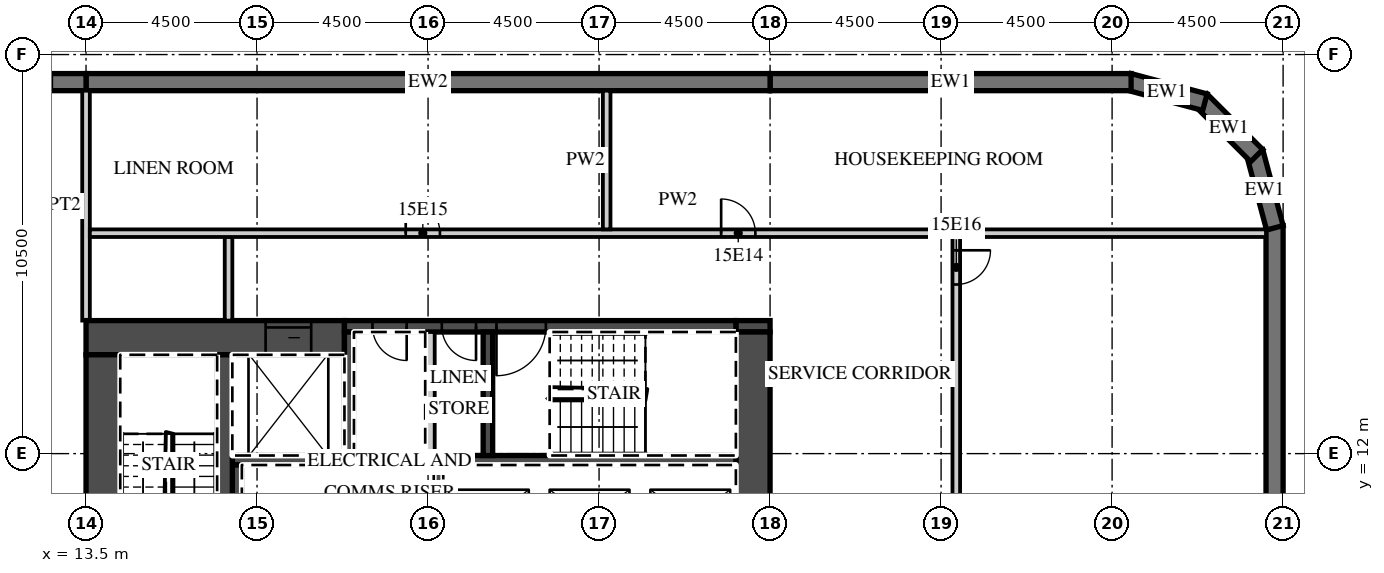
"""IFC4 building model, lengths in metres.
Left out: names, types, materials, properties, quantities, classifications, styles, units other than length and angle.
Written with IfcOpenShell. Run it as: python <this file> out.ifc"""

import sys

from ifc_helpers import new_model, si_unit, direction, frame, frame_2d, origin, place, context, subcontext, project, spatial, polyline, rectangle, outline, extrude, element, fill, save


model = new_model("IFC4")
c1 = context("Model", 3, precision=1e-05, world=origin(), true_north=direction((0.0, 1.0)))
c2 = subcontext(c1, "Body", "Model", "MODEL_VIEW")
j1 = project(units=[si_unit("LENGTHUNIT", "METRE"), si_unit("PLANEANGLEUNIT", "RADIAN")], contexts=[c1])
p1 = place(None, origin())
s1 = spatial("IfcSite", under=j1, at=p1, CompositionType="ELEMENT")
p2 = place(p1, origin())
s2 = spatial("IfcBuilding", under=s1, at=p2, CompositionType="ELEMENT")
p3 = place(p2, frame((0.0, 0.0, 79.8)))
s3 = spatial("IfcBuildingStorey", under=s2, at=p3, CompositionType="ELEMENT", Elevation=79.8)
p4 = place(p3, frame((44.775, -18.0, 0.0), z_axis=(0.0, 0.0, 1.0), x_axis=(0.0, 1.0, 0.0)))
e1 = element("IfcWall", 1, at=p4, inside=s3, PredefinedType="SOLIDWALL", context=c2, shape_type="SweptSolid", body=[
    extrude(rectangle(XDim=36.0, YDim=0.45, at=frame_2d((18.0, 0.0))), origin(), (0.0, 0.0, 1.0), 3.02),
])
p5 = place(p4, frame((3.9, 0.0, 0.45)))
e2 = element("IfcOpeningElement", 2, at=p5, cuts=e1, PredefinedType="OPENING", context=c2, shape_type="SweptSolid", body=[
    extrude(rectangle(XDim=3.3, YDim=2.25, at=frame_2d((1.65, 1.125))), frame((0.0, 0.235, 0.0), z_axis=(0.0, -1.0, 0.0), x_axis=(1.0, 0.0, 0.0)), (0.0, 0.0, 1.0), 0.47),
])
p6 = place(p4, frame((8.4, 0.0, 0.45)))
e3 = element("IfcOpeningElement", 3, at=p6, cuts=e1, PredefinedType="OPENING", context=c2, shape_type="SweptSolid", body=[
    extrude(rectangle(XDim=3.3, YDim=2.25, at=frame_2d((1.65, 1.125))), frame((0.0, 0.235, 0.0), z_axis=(0.0, -1.0, 0.0), x_axis=(1.0, 0.0, 0.0)), (0.0, 0.0, 1.0), 0.47),
])
p7 = place(p4, frame((12.9, 0.0, 0.45)))
e4 = element("IfcOpeningElement", 4, at=p7, cuts=e1, PredefinedType="OPENING", context=c2, shape_type="SweptSolid", body=[
    extrude(rectangle(XDim=3.3, YDim=2.25, at=frame_2d((1.65, 1.125))), frame((0.0, 0.235, 0.0), z_axis=(0.0, -1.0, 0.0), x_axis=(1.0, 0.0, 0.0)), (0.0, 0.0, 1.0), 0.47),
])
p8 = place(p3, frame((44.783, 17.942, 0.0), z_axis=(0.0, 0.0, 1.0), x_axis=(-0.25881466832, 0.965926999034, 0.0)))
e5 = element("IfcWall", 5, at=p8, inside=s3, PredefinedType="SOLIDWALL", context=c2, shape_type="SweptSolid", body=[
    extrude(outline(polyline([(0.0, -0.225), (2.071, -0.225), (1.95, 0.225), (0.121, 0.225), (0.0, -0.225)])), origin(), (0.0, 0.0, 1.0), 3.02),
])
p9 = place(p3, frame((44.305, 19.841, 0.0), z_axis=(0.0, 0.0, 1.0), x_axis=(-0.707106781187, 0.707106781187, 0.0)))
e6 = element("IfcWall", 6, at=p9, inside=s3, PredefinedType="SOLIDWALL", context=c2, shape_type="SweptSolid", body=[
    extrude(outline(polyline([(0.0, -0.225), (2.071, -0.225), (1.95, 0.225), (0.121, 0.225), (0.0, -0.225)])), origin(), (0.0, 0.0, 1.0), 3.02),
])
p10 = place(p3, frame((42.942, 21.247, 0.0), z_axis=(0.0, 0.0, 1.0), x_axis=(-0.965926999034, 0.25881466832, 0.0)))
e7 = element("IfcWall", 7, at=p10, inside=s3, PredefinedType="SOLIDWALL", context=c2, shape_type="SweptSolid", body=[
    extrude(outline(polyline([(-0.0, -0.225), (2.07, -0.225), (1.95, 0.225), (0.12, 0.225), (-0.0, -0.225)])), origin(), (0.0, 0.0, 1.0), 3.02),
])
p11 = place(p3, frame((41.0, 21.775, 0.0), z_axis=(0.0, 0.0, 1.0), x_axis=(-1.0, 0.0, 0.0)))
e8 = element("IfcWall", 8, at=p11, inside=s3, PredefinedType="SOLIDWALL", context=c2, shape_type="SweptSolid", body=[
    extrude(rectangle(XDim=9.5, YDim=0.45, at=frame_2d((4.75, 0.0))), origin(), (0.0, 0.0, 1.0), 3.02),
])
p12 = place(p3, frame((31.5, 21.775, 0.0), z_axis=(0.0, 0.0, 1.0), x_axis=(-1.0, 0.0, 0.0)))
e9 = element("IfcWall", 9, at=p12, inside=s3, PredefinedType="SOLIDWALL", context=c2, shape_type="SweptSolid", body=[
    extrude(rectangle(XDim=18.0, YDim=0.45, at=frame_2d((9.0, 0.0))), origin(), (0.0, 0.0, 1.0), 3.02),
])
p13 = place(p3, frame((13.5, 21.775, 0.0), z_axis=(0.0, 0.0, 1.0), x_axis=(-1.0, 0.0, 0.0)))
e10 = element("IfcWall", 10, at=p13, inside=s3, PredefinedType="SOLIDWALL", context=c2, shape_type="SweptSolid", body=[
    extrude(rectangle(XDim=54.5, YDim=0.45, at=frame_2d((27.25, 0.0))), origin(), (0.0, 0.0, 1.0), 3.02),
])
p14 = place(p13, frame((0.9, 0.0, 0.45)))
e11 = element("IfcOpeningElement", 11, at=p14, cuts=e10, PredefinedType="OPENING", context=c2, shape_type="SweptSolid", body=[
    extrude(rectangle(XDim=2.7, YDim=2.25, at=frame_2d((1.35, 1.125))), frame((0.0, 0.235, 0.0), z_axis=(0.0, -1.0, 0.0), x_axis=(1.0, 0.0, 0.0)), (0.0, 0.0, 1.0), 0.47),
])
p15 = place(p13, frame((5.4, 0.0, 0.45)))
e12 = element("IfcOpeningElement", 12, at=p15, cuts=e10, PredefinedType="OPENING", context=c2, shape_type="SweptSolid", body=[
    extrude(rectangle(XDim=2.7, YDim=2.25, at=frame_2d((1.35, 1.125))), frame((0.0, 0.235, 0.0), z_axis=(0.0, -1.0, 0.0), x_axis=(1.0, 0.0, 0.0)), (0.0, 0.0, 1.0), 0.47),
])
p16 = place(p13, frame((9.9, 0.0, 0.45)))
e13 = element("IfcOpeningElement", 13, at=p16, cuts=e10, PredefinedType="OPENING", context=c2, shape_type="SweptSolid", body=[
    extrude(rectangle(XDim=2.7, YDim=2.25, at=frame_2d((1.35, 1.125))), frame((0.0, 0.235, 0.0), z_axis=(0.0, -1.0, 0.0), x_axis=(1.0, 0.0, 0.0)), (0.0, 0.0, 1.0), 0.47),
])
p17 = place(p13, frame((14.4, 0.0, 0.45)))
e14 = element("IfcOpeningElement", 14, at=p17, cuts=e10, PredefinedType="OPENING", context=c2, shape_type="SweptSolid", body=[
    extrude(rectangle(XDim=2.7, YDim=2.25, at=frame_2d((1.35, 1.125))), frame((0.0, 0.235, 0.0), z_axis=(0.0, -1.0, 0.0), x_axis=(1.0, 0.0, 0.0)), (0.0, 0.0, 1.0), 0.47),
])
p18 = place(p13, frame((18.9, 0.0, 0.45)))
e15 = element("IfcOpeningElement", 15, at=p18, cuts=e10, PredefinedType="OPENING", context=c2, shape_type="SweptSolid", body=[
    extrude(rectangle(XDim=2.7, YDim=2.25, at=frame_2d((1.35, 1.125))), frame((0.0, 0.235, 0.0), z_axis=(0.0, -1.0, 0.0), x_axis=(1.0, 0.0, 0.0)), (0.0, 0.0, 1.0), 0.47),
])
p19 = place(p13, frame((23.4, 0.0, 0.45)))
e16 = element("IfcOpeningElement", 16, at=p19, cuts=e10, PredefinedType="OPENING", context=c2, shape_type="SweptSolid", body=[
    extrude(rectangle(XDim=2.7, YDim=2.25, at=frame_2d((1.35, 1.125))), frame((0.0, 0.235, 0.0), z_axis=(0.0, -1.0, 0.0), x_axis=(1.0, 0.0, 0.0)), (0.0, 0.0, 1.0), 0.47),
])
p20 = place(p13, frame((27.9, 0.0, 0.45)))
e17 = element("IfcOpeningElement", 17, at=p20, cuts=e10, PredefinedType="OPENING", context=c2, shape_type="SweptSolid", body=[
    extrude(rectangle(XDim=2.7, YDim=2.25, at=frame_2d((1.35, 1.125))), frame((0.0, 0.235, 0.0), z_axis=(0.0, -1.0, 0.0), x_axis=(1.0, 0.0, 0.0)), (0.0, 0.0, 1.0), 0.47),
])
p21 = place(p13, frame((32.4, 0.0, 0.45)))
e18 = element("IfcOpeningElement", 18, at=p21, cuts=e10, PredefinedType="OPENING", context=c2, shape_type="SweptSolid", body=[
    extrude(rectangle(XDim=2.7, YDim=2.25, at=frame_2d((1.35, 1.125))), frame((0.0, 0.235, 0.0), z_axis=(0.0, -1.0, 0.0), x_axis=(1.0, 0.0, 0.0)), (0.0, 0.0, 1.0), 0.47),
])
p22 = place(p13, frame((36.9, 0.0, 0.45)))
e19 = element("IfcOpeningElement", 19, at=p22, cuts=e10, PredefinedType="OPENING", context=c2, shape_type="SweptSolid", body=[
    extrude(rectangle(XDim=2.7, YDim=2.25, at=frame_2d((1.35, 1.125))), frame((0.0, 0.235, 0.0), z_axis=(0.0, -1.0, 0.0), x_axis=(1.0, 0.0, 0.0)), (0.0, 0.0, 1.0), 0.47),
])
p23 = place(p13, frame((41.4, 0.0, 0.45)))
e20 = element("IfcOpeningElement", 20, at=p23, cuts=e10, PredefinedType="OPENING", context=c2, shape_type="SweptSolid", body=[
    extrude(rectangle(XDim=2.7, YDim=2.25, at=frame_2d((1.35, 1.125))), frame((0.0, 0.235, 0.0), z_axis=(0.0, -1.0, 0.0), x_axis=(1.0, 0.0, 0.0)), (0.0, 0.0, 1.0), 0.47),
])
p24 = place(p13, frame((45.9, 0.0, 0.45)))
e21 = element("IfcOpeningElement", 21, at=p24, cuts=e10, PredefinedType="OPENING", context=c2, shape_type="SweptSolid", body=[
    extrude(rectangle(XDim=2.7, YDim=2.25, at=frame_2d((1.35, 1.125))), frame((0.0, 0.235, 0.0), z_axis=(0.0, -1.0, 0.0), x_axis=(1.0, 0.0, 0.0)), (0.0, 0.0, 1.0), 0.47),
])
p25 = place(p13, frame((50.4, 0.0, 0.45)))
e22 = element("IfcOpeningElement", 22, at=p25, cuts=e10, PredefinedType="OPENING", context=c2, shape_type="SweptSolid", body=[
    extrude(rectangle(XDim=2.7, YDim=2.25, at=frame_2d((1.35, 1.125))), frame((0.0, 0.235, 0.0), z_axis=(0.0, -1.0, 0.0), x_axis=(1.0, 0.0, 0.0)), (0.0, 0.0, 1.0), 0.47),
])
p26 = place(p3, frame((13.5, 15.5, 0.0), z_axis=(0.0, 0.0, 1.0), x_axis=(0.0, 1.0, 0.0)))
e23 = element("IfcWall", 23, at=p26, inside=s3, PredefinedType="PARTITIONING", context=c2, shape_type="SweptSolid", body=[
    extrude(rectangle(XDim=6.05, YDim=0.2, at=frame_2d((3.025, 0.0))), origin(), (0.0, 0.0, 1.0), 3.02),
])
p27 = place(p3, frame((13.5, 15.05, 0.0), z_axis=(0.0, 0.0, 1.0), x_axis=(1.0, 0.0, 0.0)))
e24 = element("IfcWall", 24, at=p27, inside=s3, PredefinedType="SHEAR", context=c2, shape_type="SweptSolid", body=[
    extrude(rectangle(XDim=6.8, YDim=0.9, at=frame_2d((3.4, 0.0))), origin(), (0.0, 0.0, 1.0), 3.02),
])
p28 = place(p27, frame((4.725, 0.0, 0.0)))
e25 = element("IfcOpeningElement", 25, at=p28, cuts=e24, PredefinedType="OPENING", context=c2, shape_type="SweptSolid", body=[
    extrude(rectangle(XDim=1.2, YDim=2.1, at=frame_2d((0.6, 1.05))), frame((0.0, 0.46, 0.0), z_axis=(0.0, -1.0, 0.0), x_axis=(1.0, 0.0, 0.0)), (0.0, 0.0, 1.0), 0.92),
])
p29 = place(p3, frame((30.6, 15.35, 0.0), z_axis=(0.0, 0.0, 1.0), x_axis=(1.0, 0.0, 0.0)))
e26 = element("IfcWall", 26, at=p29, inside=s3, PredefinedType="SHEAR", context=c2, shape_type="SweptSolid", body=[
    extrude(rectangle(XDim=0.9, YDim=0.3, at=frame_2d((0.45, 0.0))), origin(), (0.0, 0.0, 1.0), 3.02),
])
p30 = place(p3, frame((20.3, 15.35, 0.0), z_axis=(0.0, 0.0, 1.0), x_axis=(1.0, 0.0, 0.0)))
e27 = element("IfcWall", 27, at=p30, inside=s3, PredefinedType="SHEAR", context=c2, shape_type="SweptSolid", body=[
    extrude(rectangle(XDim=10.3, YDim=0.3, at=frame_2d((5.15, 0.0))), origin(), (0.0, 0.0, 1.0), 3.02),
])
p31 = place(p30, frame((4.0, 0.0, 0.0)))
e28 = element("IfcOpeningElement", 28, at=p31, cuts=e27, PredefinedType="OPENING", context=c2, shape_type="SweptSolid", body=[
    extrude(rectangle(XDim=1.3, YDim=2.1, at=frame_2d((0.65, 1.05))), frame((0.0, 0.16, 0.0), z_axis=(0.0, -1.0, 0.0), x_axis=(1.0, 0.0, 0.0)), (0.0, 0.0, 1.0), 0.32),
])
p32 = place(p30, frame((2.562, 0.0, 0.0)))
e29 = element("IfcOpeningElement", 29, at=p32, cuts=e27, PredefinedType="OPENING", context=c2, shape_type="SweptSolid", body=[
    extrude(rectangle(XDim=0.9, YDim=2.1, at=frame_2d((0.45, 1.05))), frame((0.0, 0.16, 0.0), z_axis=(0.0, -1.0, 0.0), x_axis=(1.0, 0.0, 0.0)), (0.0, 0.0, 1.0), 0.32),
])
p33 = place(p30, frame((0.738, 0.0, 0.0)))
e30 = element("IfcOpeningElement", 30, at=p33, cuts=e27, PredefinedType="OPENING", context=c2, shape_type="SweptSolid", body=[
    extrude(rectangle(XDim=0.9, YDim=2.1, at=frame_2d((0.45, 1.05))), frame((0.0, 0.16, 0.0), z_axis=(0.0, -1.0, 0.0), x_axis=(1.0, 0.0, 0.0)), (0.0, 0.0, 1.0), 0.32),
])
p34 = place(p3, frame((31.05, 2.4, 0.0), z_axis=(0.0, 0.0, 1.0), x_axis=(0.0, 1.0, 0.0)))
e31 = element("IfcWall", 31, at=p34, inside=s3, PredefinedType="SHEAR", context=c2, shape_type="SweptSolid", body=[
    extrude(rectangle(XDim=12.8, YDim=0.9, at=frame_2d((6.4, 0.0))), origin(), (0.0, 0.0, 1.0), 3.02),
])
p35 = place(p34, frame((0.2, 0.0, 0.0)))
e32 = element("IfcOpeningElement", 32, at=p35, cuts=e31, PredefinedType="OPENING", context=c2, shape_type="SweptSolid", body=[
    extrude(rectangle(XDim=1.1, YDim=2.1, at=frame_2d((0.55, 1.05))), frame((0.0, 0.46, 0.0), z_axis=(0.0, -1.0, 0.0), x_axis=(1.0, 0.0, 0.0)), (0.0, 0.0, 1.0), 0.92),
])
p36 = place(p3, frame((13.95, 2.4, 0.0), z_axis=(0.0, 0.0, 1.0), x_axis=(0.0, 1.0, 0.0)))
e33 = element("IfcWall", 33, at=p36, inside=s3, PredefinedType="SHEAR", context=c2, shape_type="SweptSolid", body=[
    extrude(rectangle(XDim=12.2, YDim=0.9, at=frame_2d((6.1, 0.0))), origin(), (0.0, 0.0, 1.0), 3.02),
])
p37 = place(p3, frame((17.35, 11.825, 0.0), z_axis=(0.0, 0.0, 1.0), x_axis=(1.0, 0.0, 0.0)))
e34 = element("IfcWall", 34, at=p37, inside=s3, PredefinedType="SHEAR", context=c2, shape_type="SweptSolid", body=[
    extrude(rectangle(XDim=13.25, YDim=0.25, at=frame_2d((6.625, 0.0))), origin(), (0.0, 0.0, 1.0), 3.02),
])
for number, where, z_axis, x_axis in (
    (35, (17.475, 8.8, 0.0), (0.0, 0.0, 1.0), (0.0, 1.0, 0.0)),
    (36, (22.775, 8.8, 0.0), (0.0, 0.0, 1.0), (0.0, 1.0, 0.0)),
):
    element("IfcWall", number, at=place(p3, frame(where, z_axis=z_axis, x_axis=x_axis)), inside=s3, PredefinedType="SHEAR", context=c2, shape_type="SweptSolid", body=[
        extrude(rectangle(XDim=2.9, YDim=0.25, at=frame_2d((1.45, 0.0))), origin(), (0.0, 0.0, 1.0), 3.02),
    ])
p38 = place(p3, frame((17.15, 8.8, 0.0), z_axis=(0.0, 0.0, 1.0), x_axis=(0.0, 1.0, 0.0)))
e37 = element("IfcWall", 37, at=p38, inside=s3, PredefinedType="SHEAR", context=c2, shape_type="SweptSolid", body=[
    extrude(rectangle(XDim=5.8, YDim=0.4, at=frame_2d((2.9, 0.0))), origin(), (0.0, 0.0, 1.0), 3.02),
])
for number, where, z_axis, x_axis in (
    (38, (20.425, 11.95, 0.0), (0.0, 0.0, 1.0), (0.0, 1.0, 0.0)),
    (39, (24.075, 11.95, 0.0), (0.0, 0.0, 1.0), (0.0, 1.0, 0.0)),
):
    element("IfcWall", number, at=place(p3, frame(where, z_axis=z_axis, x_axis=x_axis)), inside=s3, PredefinedType="SHEAR", context=c2, shape_type="SweptSolid", body=[
        extrude(rectangle(XDim=3.25, YDim=0.25, at=frame_2d((1.625, 0.0))), origin(), (0.0, 0.0, 1.0), 3.02),
    ])
p39 = place(p3, frame((22.55, 11.95, 0.0), z_axis=(0.0, 0.0, 1.0), x_axis=(0.0, 1.0, 0.0)))
e40 = element("IfcWall", 40, at=p39, inside=s3, PredefinedType="PARTITIONING", context=c2, shape_type="SweptSolid", body=[
    extrude(rectangle(XDim=3.25, YDim=0.25, at=frame_2d((1.625, 0.0))), origin(), (0.0, 0.0, 1.0), 3.02),
])
p40 = place(p3, frame((17.25, 15.5, 0.0), z_axis=(0.0, 0.0, 1.0), x_axis=(0.0, 1.0, 0.0)))
e41 = element("IfcWall", 41, at=p40, inside=s3, PredefinedType="PARTITIONING", context=c2, shape_type="SweptSolid", body=[
    extrude(rectangle(XDim=2.2, YDim=0.2, at=frame_2d((1.1, 0.0))), origin(), (0.0, 0.0, 1.0), 3.02),
])
p41 = place(p3, frame((36.4, 1.75, 0.0), z_axis=(0.0, 0.0, 1.0), x_axis=(0.0, 1.0, 0.0)))
e42 = element("IfcWall", 42, at=p41, inside=s3, PredefinedType="PARTITIONING", context=c2, shape_type="SweptSolid", body=[
    extrude(rectangle(XDim=15.95, YDim=0.2, at=frame_2d((7.975, 0.0))), origin(), (0.0, 0.0, 1.0), 3.02),
])
p42 = place(p41, frame((14.7, 0.0, 0.0)))
e43 = element("IfcOpeningElement", 43, at=p42, cuts=e42, PredefinedType="OPENING", context=c2, shape_type="SweptSolid", body=[
    extrude(rectangle(XDim=0.9, YDim=2.1, at=frame_2d((0.45, 1.05))), frame((0.0, 0.11, 0.0), z_axis=(0.0, -1.0, 0.0), x_axis=(1.0, 0.0, 0.0)), (0.0, 0.0, 1.0), 0.22),
])
p43 = place(p3, frame((13.6, 17.8, 0.0), z_axis=(0.0, 0.0, 1.0), x_axis=(1.0, 0.0, 0.0)))
e44 = element("IfcWall", 44, at=p43, inside=s3, PredefinedType="PARTITIONING", context=c2, shape_type="SweptSolid", body=[
    extrude(rectangle(XDim=30.95, YDim=0.2, at=frame_2d((15.475, 0.0))), origin(), (0.0, 0.0, 1.0), 3.02),
])
p44 = place(p43, frame((16.613, 0.0, 0.0)))
e45 = element("IfcOpeningElement", 45, at=p44, cuts=e44, PredefinedType="OPENING", context=c2, shape_type="SweptSolid", body=[
    extrude(rectangle(XDim=0.9, YDim=2.1, at=frame_2d((0.45, 1.05))), frame((0.0, 0.11, 0.0), z_axis=(0.0, -1.0, 0.0), x_axis=(1.0, 0.0, 0.0)), (0.0, 0.0, 1.0), 0.22),
])
p45 = place(p43, frame((8.312, 0.0, 0.0)))
e46 = element("IfcOpeningElement", 46, at=p45, cuts=e44, PredefinedType="OPENING", context=c2, shape_type="SweptSolid", body=[
    extrude(rectangle(XDim=0.9, YDim=2.1, at=frame_2d((0.45, 1.05))), frame((0.0, 0.11, 0.0), z_axis=(0.0, -1.0, 0.0), x_axis=(1.0, 0.0, 0.0)), (0.0, 0.0, 1.0), 0.22),
])
p46 = place(p3, frame((27.2, 17.9, 0.0), z_axis=(0.0, 0.0, 1.0), x_axis=(0.0, 1.0, 0.0)))
e47 = element("IfcWall", 47, at=p46, inside=s3, PredefinedType="PARTITIONING", context=c2, shape_type="SweptSolid", body=[
    extrude(rectangle(XDim=3.65, YDim=0.2, at=frame_2d((1.825, 0.0))), origin(), (0.0, 0.0, 1.0), 3.02),
])
p47 = place(p28, origin())
e48 = element("IfcDoor", 48, at=p47, inside=s3, OperationType="SLIDING_TO_LEFT", PredefinedType="DOOR", context=c2, shape_type="SweptSolid", body=[
    extrude(rectangle(XDim=1.2, YDim=2.1, at=frame_2d((0.6, 1.05))), frame((0.0, 0.025, 0.0), z_axis=(0.0, -1.0, 0.0), x_axis=(1.0, 0.0, 0.0)), (0.0, 0.0, 1.0), 0.05),
])
fill(e25, e48)
p48 = place(p31, origin())
e49 = element("IfcDoor", 49, at=p48, inside=s3, OperationType="SINGLE_SWING_LEFT", PredefinedType="DOOR", context=c2, shape_type="SweptSolid", body=[
    extrude(rectangle(XDim=1.3, YDim=2.1, at=frame_2d((0.65, 1.05))), frame((0.0, 0.025, 0.0), z_axis=(0.0, -1.0, 0.0), x_axis=(1.0, 0.0, 0.0)), (0.0, 0.0, 1.0), 0.05),
])
fill(e28, e49)
p49 = place(p32, origin())
e50 = element("IfcDoor", 50, at=p49, inside=s3, OperationType="SINGLE_SWING_RIGHT", PredefinedType="DOOR", context=c2, shape_type="SweptSolid", body=[
    extrude(rectangle(XDim=0.9, YDim=2.1, at=frame_2d((0.45, 1.05))), frame((0.0, 0.025, 0.0), z_axis=(0.0, -1.0, 0.0), x_axis=(1.0, 0.0, 0.0)), (0.0, 0.0, 1.0), 0.05),
])
fill(e29, e50)
p50 = place(p33, origin())
e51 = element("IfcDoor", 51, at=p50, inside=s3, OperationType="SINGLE_SWING_RIGHT", PredefinedType="DOOR", context=c2, shape_type="SweptSolid", body=[
    extrude(rectangle(XDim=0.9, YDim=2.1, at=frame_2d((0.45, 1.05))), frame((0.0, 0.025, 0.0), z_axis=(0.0, -1.0, 0.0), x_axis=(1.0, 0.0, 0.0)), (0.0, 0.0, 1.0), 0.05),
])
fill(e30, e51)
p51 = place(p44, origin())
e52 = element("IfcDoor", 52, at=p51, inside=s3, OperationType="SINGLE_SWING_LEFT", PredefinedType="DOOR", context=c2, shape_type="SweptSolid", body=[
    extrude(rectangle(XDim=0.9, YDim=2.1, at=frame_2d((0.45, 1.05))), frame((0.0, 0.025, 0.0), z_axis=(0.0, -1.0, 0.0), x_axis=(1.0, 0.0, 0.0)), (0.0, 0.0, 1.0), 0.05),
])
fill(e45, e52)
p52 = place(p45, origin())
e53 = element("IfcDoor", 53, at=p52, inside=s3, OperationType="SINGLE_SWING_LEFT", PredefinedType="DOOR", context=c2, shape_type="SweptSolid", body=[
    extrude(rectangle(XDim=0.9, YDim=2.1, at=frame_2d((0.45, 1.05))), frame((0.0, 0.025, 0.0), z_axis=(0.0, -1.0, 0.0), x_axis=(1.0, 0.0, 0.0)), (0.0, 0.0, 1.0), 0.05),
])
fill(e46, e53)
p53 = place(p42, origin())
e54 = element("IfcDoor", 54, at=p53, inside=s3, OperationType="SINGLE_SWING_RIGHT", PredefinedType="DOOR", context=c2, shape_type="SweptSolid", body=[
    extrude(rectangle(XDim=0.9, YDim=2.1, at=frame_2d((0.45, 1.05))), frame((0.0, 0.025, 0.0), z_axis=(0.0, -1.0, 0.0), x_axis=(1.0, 0.0, 0.0)), (0.0, 0.0, 1.0), 0.05),
])
fill(e43, e54)
save(model, sys.argv[1])
